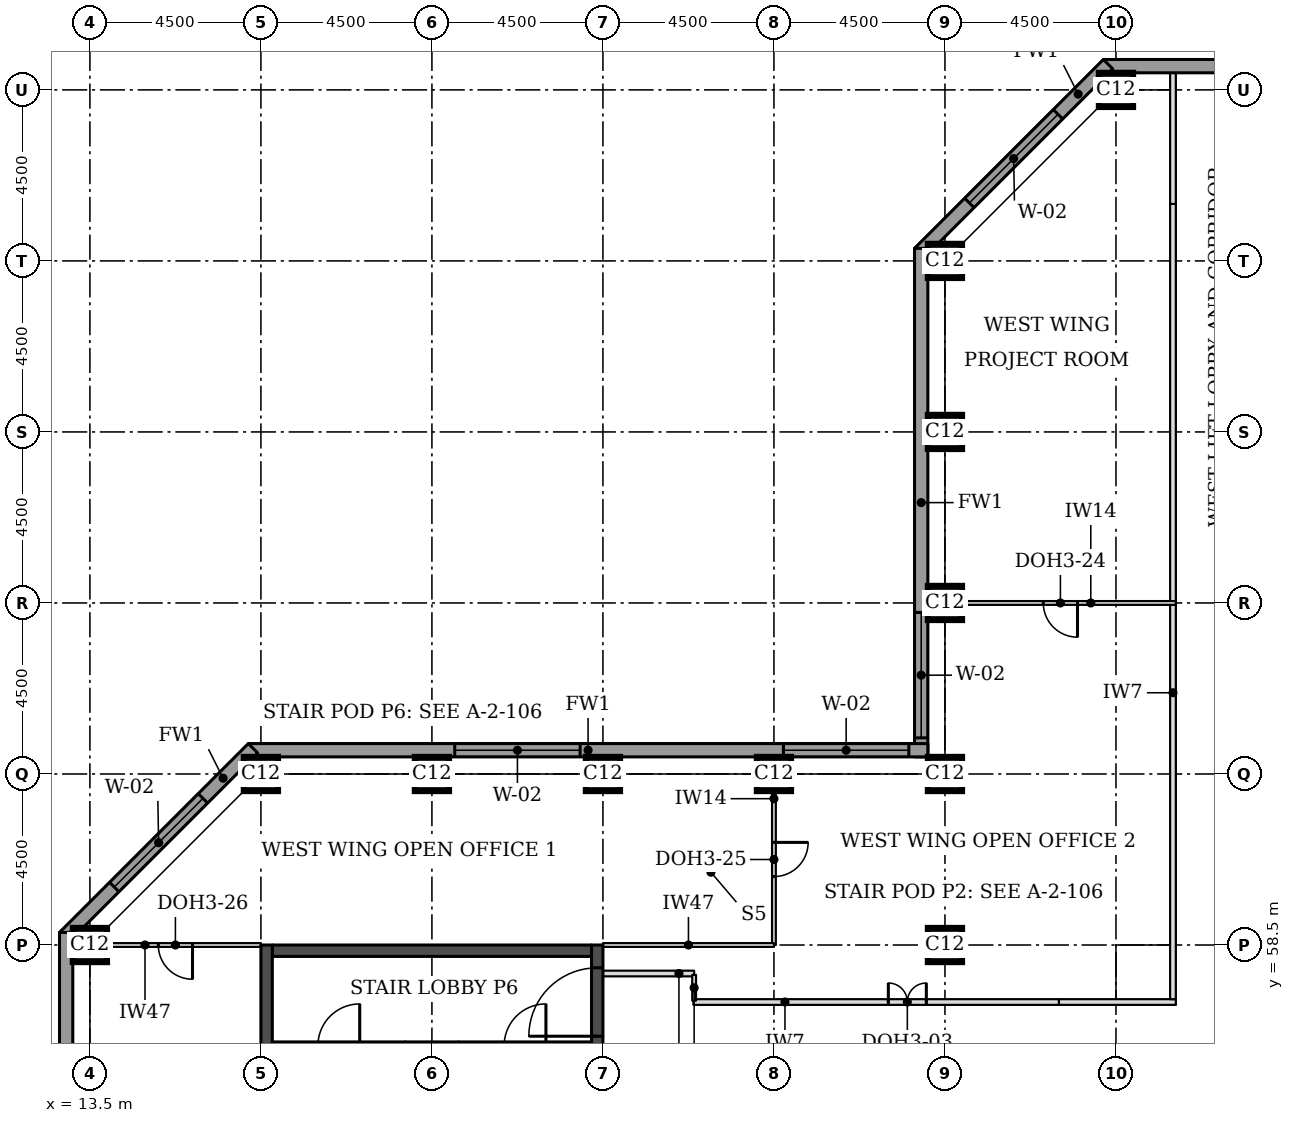
"""IFC4 building model, lengths in metres.
Left out: names, types, materials, properties, quantities, classifications, styles, units other than length and angle.
Written with IfcOpenShell. Run it as: python <this file> out.ifc"""

import sys

from ifc_helpers import new_model, si_unit, direction, frame, frame_2d, origin, origin_2d, place, context, subcontext, project, spatial, rectangle, extrude, element, fill, save


model = new_model("IFC4")
c1 = context("Model", 3, precision=1e-05, world=origin(), true_north=direction((0.0, 1.0)))
c2 = subcontext(c1, "Body", "Model", "MODEL_VIEW")
j1 = project(units=[si_unit("LENGTHUNIT", "METRE"), si_unit("PLANEANGLEUNIT", "RADIAN")], contexts=[c1])
p1 = place(None, origin())
s1 = spatial("IfcSite", under=j1, at=p1, CompositionType="ELEMENT")
p2 = place(p1, origin())
s2 = spatial("IfcBuilding", under=s1, at=p2, CompositionType="ELEMENT")
p3 = place(p2, frame((0.0, 0.0, 162.5)))
s3 = spatial("IfcBuildingStorey", under=s2, at=p3, CompositionType="ELEMENT", Elevation=162.5)
for number, where, z_axis, x_axis in (
    (1, (13.5, 58.5, 0.0), (0.0, 0.0, 1.0), (1.0, 0.0, 0.0)),
    (2, (36.0, 58.5, 0.0), (0.0, 0.0, 1.0), (1.0, 0.0, 0.0)),
    (3, (18.0, 63.0, 0.0), (0.0, 0.0, 1.0), (1.0, 0.0, 0.0)),
    (4, (22.5, 63.0, 0.0), (0.0, 0.0, 1.0), (1.0, 0.0, 0.0)),
    (5, (27.0, 63.0, 0.0), (0.0, 0.0, 1.0), (1.0, 0.0, 0.0)),
    (6, (31.5, 63.0, 0.0), (0.0, 0.0, 1.0), (1.0, 0.0, 0.0)),
    (7, (36.0, 63.0, 0.0), (0.0, 0.0, 1.0), (1.0, 0.0, 0.0)),
    (8, (36.0, 67.5, 0.0), (0.0, 0.0, 1.0), (1.0, 0.0, 0.0)),
    (9, (36.0, 72.0, 0.0), (0.0, 0.0, 1.0), (1.0, 0.0, 0.0)),
    (10, (36.0, 76.5, 0.0), (0.0, 0.0, 1.0), (1.0, 0.0, 0.0)),
    (11, (40.5, 81.0, 0.0), (0.0, 0.0, 1.0), (1.0, 0.0, 0.0)),
):
    element("IfcColumn", number, at=place(p3, frame(where, z_axis=z_axis, x_axis=x_axis)), inside=s3, PredefinedType="COLUMN", context=c2, shape_type="SweptSolid", body=[
        extrude(rectangle(XDim=0.9, YDim=0.9, at=origin_2d()), origin(), (0.0, 0.0, 1.0), 3.7),
    ])
p4 = place(p3, frame((18.3, 58.35, 0.0), z_axis=(0.0, 0.0, 1.0), x_axis=(1.0, 0.0, 0.0)))
e12 = element("IfcWall", 12, at=p4, inside=s3, PredefinedType="SHEAR", context=c2, shape_type="SweptSolid", body=[
    extrude(rectangle(XDim=8.4, YDim=0.3, at=frame_2d((4.2, 0.0))), origin(), (0.0, 0.0, 1.0), 3.7),
])
p5 = place(p3, frame((18.15, 49.5, 0.0), z_axis=(0.0, 0.0, 1.0), x_axis=(0.0, 1.0, 0.0)))
e13 = element("IfcWall", 13, at=p5, inside=s3, PredefinedType="SHEAR", context=c2, shape_type="SweptSolid", body=[
    extrude(rectangle(XDim=9.0, YDim=0.3, at=frame_2d((4.5, 0.0))), origin(), (0.0, 0.0, 1.0), 3.7),
])
p6 = place(p3, frame((26.85, 49.5, 0.0), z_axis=(0.0, 0.0, 1.0), x_axis=(0.0, 1.0, 0.0)))
e14 = element("IfcWall", 14, at=p6, inside=s3, PredefinedType="SHEAR", context=c2, shape_type="SweptSolid", body=[
    extrude(rectangle(XDim=9.0, YDim=0.3, at=frame_2d((4.5, 0.0))), origin(), (0.0, 0.0, 1.0), 3.7),
])
p7 = place(p6, frame((6.6, 0.0, 0.0)))
e15 = element("IfcOpeningElement", 15, at=p7, cuts=e14, PredefinedType="OPENING", context=c2, shape_type="SweptSolid", body=[
    extrude(rectangle(XDim=1.8, YDim=2.1, at=frame_2d((0.9, 1.05))), frame((0.0, 0.16, 0.0), z_axis=(0.0, -1.0, 0.0), x_axis=(1.0, 0.0, 0.0)), (0.0, 0.0, 1.0), 0.32),
])
p8 = place(p3, frame((72.331, 81.625, 0.0), z_axis=(0.0, 0.0, 1.0), x_axis=(-1.0, 0.0, 0.0)))
e16 = element("IfcWall", 16, at=p8, inside=s3, PredefinedType="STANDARD", context=c2, shape_type="SweptSolid", body=[
    extrude(rectangle(XDim=32.163, YDim=0.35, at=frame_2d((16.081, 0.0))), origin(), (0.0, 0.0, 1.0), 3.525),
])
p9 = place(p8, frame((5.431, 0.0, 0.9)))
e17 = element("IfcOpeningElement", 17, at=p9, cuts=e16, PredefinedType="OPENING", context=c2, shape_type="SweptSolid", body=[
    extrude(rectangle(XDim=3.3, YDim=1.9, at=frame_2d((1.65, 0.95))), frame((0.0, 0.185, 0.0), z_axis=(0.0, -1.0, 0.0), x_axis=(1.0, 0.0, 0.0)), (0.0, 0.0, 1.0), 0.37),
])
p10 = place(p8, frame((9.931, 0.0, 0.9)))
e18 = element("IfcOpeningElement", 18, at=p10, cuts=e16, PredefinedType="OPENING", context=c2, shape_type="SweptSolid", body=[
    extrude(rectangle(XDim=3.3, YDim=1.9, at=frame_2d((1.65, 0.95))), frame((0.0, 0.185, 0.0), z_axis=(0.0, -1.0, 0.0), x_axis=(1.0, 0.0, 0.0)), (0.0, 0.0, 1.0), 0.37),
])
p11 = place(p8, frame((14.431, 0.0, 0.9)))
e19 = element("IfcOpeningElement", 19, at=p11, cuts=e16, PredefinedType="OPENING", context=c2, shape_type="SweptSolid", body=[
    extrude(rectangle(XDim=3.3, YDim=1.9, at=frame_2d((1.65, 0.95))), frame((0.0, 0.185, 0.0), z_axis=(0.0, -1.0, 0.0), x_axis=(1.0, 0.0, 0.0)), (0.0, 0.0, 1.0), 0.37),
])
p12 = place(p8, frame((18.931, 0.0, 0.9)))
e20 = element("IfcOpeningElement", 20, at=p12, cuts=e16, PredefinedType="OPENING", context=c2, shape_type="SweptSolid", body=[
    extrude(rectangle(XDim=3.3, YDim=1.9, at=frame_2d((1.65, 0.95))), frame((0.0, 0.185, 0.0), z_axis=(0.0, -1.0, 0.0), x_axis=(1.0, 0.0, 0.0)), (0.0, 0.0, 1.0), 0.37),
])
p13 = place(p8, frame((23.431, 0.0, 0.9)))
e21 = element("IfcOpeningElement", 21, at=p13, cuts=e16, PredefinedType="OPENING", context=c2, shape_type="SweptSolid", body=[
    extrude(rectangle(XDim=3.3, YDim=1.9, at=frame_2d((1.65, 0.95))), frame((0.0, 0.185, 0.0), z_axis=(0.0, -1.0, 0.0), x_axis=(1.0, 0.0, 0.0)), (0.0, 0.0, 1.0), 0.37),
])
p14 = place(p3, frame((40.292, 81.676, 0.0), z_axis=(0.0, 0.0, 1.0), x_axis=(-0.707106781187, -0.707106781187, 0.0)))
e22 = element("IfcWall", 22, at=p14, inside=s3, PredefinedType="STANDARD", context=c2, shape_type="SweptSolid", body=[
    extrude(rectangle(XDim=7.027, YDim=0.35, at=frame_2d((3.513, 0.0))), origin(), (0.0, 0.0, 1.0), 3.525),
])
p15 = place(p14, frame((1.863, 0.0, 0.9)))
e23 = element("IfcOpeningElement", 23, at=p15, cuts=e22, PredefinedType="OPENING", context=c2, shape_type="SweptSolid", body=[
    extrude(rectangle(XDim=3.3, YDim=1.9, at=frame_2d((1.65, 0.95))), frame((0.0, 0.185, 0.0), z_axis=(0.0, -1.0, 0.0), x_axis=(1.0, 0.0, 0.0)), (0.0, 0.0, 1.0), 0.37),
])
p16 = place(p3, frame((35.375, 76.831, 0.0), z_axis=(0.0, 0.0, 1.0), x_axis=(0.0, -1.0, 0.0)))
e24 = element("IfcWall", 24, at=p16, inside=s3, PredefinedType="STANDARD", context=c2, shape_type="SweptSolid", body=[
    extrude(rectangle(XDim=13.381, YDim=0.35, at=frame_2d((6.691, 0.0))), origin(), (0.0, 0.0, 1.0), 3.525),
])
p17 = place(p16, frame((9.581, 0.0, 0.9)))
e25 = element("IfcOpeningElement", 25, at=p17, cuts=e24, PredefinedType="OPENING", context=c2, shape_type="SweptSolid", body=[
    extrude(rectangle(XDim=3.3, YDim=1.9, at=frame_2d((1.65, 0.95))), frame((0.0, 0.185, 0.0), z_axis=(0.0, -1.0, 0.0), x_axis=(1.0, 0.0, 0.0)), (0.0, 0.0, 1.0), 0.37),
])
p18 = place(p3, frame((35.55, 63.625, 0.0), z_axis=(0.0, 0.0, 1.0), x_axis=(-1.0, 0.0, 0.0)))
e26 = element("IfcWall", 26, at=p18, inside=s3, PredefinedType="STANDARD", context=c2, shape_type="SweptSolid", body=[
    extrude(rectangle(XDim=17.881, YDim=0.35, at=frame_2d((8.941, 0.0))), origin(), (0.0, 0.0, 1.0), 3.525),
])
p19 = place(p18, frame((0.5, 0.0, 0.9)))
e27 = element("IfcOpeningElement", 27, at=p19, cuts=e26, PredefinedType="OPENING", context=c2, shape_type="SweptSolid", body=[
    extrude(rectangle(XDim=3.3, YDim=1.9, at=frame_2d((1.65, 0.95))), frame((0.0, 0.185, 0.0), z_axis=(0.0, -1.0, 0.0), x_axis=(1.0, 0.0, 0.0)), (0.0, 0.0, 1.0), 0.37),
])
p20 = place(p18, frame((9.15, 0.0, 0.9)))
e28 = element("IfcOpeningElement", 28, at=p20, cuts=e26, PredefinedType="OPENING", context=c2, shape_type="SweptSolid", body=[
    extrude(rectangle(XDim=3.3, YDim=1.9, at=frame_2d((1.65, 0.95))), frame((0.0, 0.185, 0.0), z_axis=(0.0, -1.0, 0.0), x_axis=(1.0, 0.0, 0.0)), (0.0, 0.0, 1.0), 0.37),
])
p21 = place(p3, frame((17.792, 63.676, 0.0), z_axis=(0.0, 0.0, 1.0), x_axis=(-0.707106781187, -0.707106781187, 0.0)))
e29 = element("IfcWall", 29, at=p21, inside=s3, PredefinedType="STANDARD", context=c2, shape_type="SweptSolid", body=[
    extrude(rectangle(XDim=7.027, YDim=0.35, at=frame_2d((3.513, 0.0))), origin(), (0.0, 0.0, 1.0), 3.525),
])
p22 = place(p21, frame((1.863, 0.0, 0.9)))
e30 = element("IfcOpeningElement", 30, at=p22, cuts=e29, PredefinedType="OPENING", context=c2, shape_type="SweptSolid", body=[
    extrude(rectangle(XDim=3.3, YDim=1.9, at=frame_2d((1.65, 0.95))), frame((0.0, 0.185, 0.0), z_axis=(0.0, -1.0, 0.0), x_axis=(1.0, 0.0, 0.0)), (0.0, 0.0, 1.0), 0.37),
])
p23 = place(p3, frame((12.875, 58.831, 0.0), z_axis=(0.0, 0.0, 1.0), x_axis=(0.0, -1.0, 0.0)))
e31 = element("IfcWall", 31, at=p23, inside=s3, PredefinedType="STANDARD", context=c2, shape_type="SweptSolid", body=[
    extrude(rectangle(XDim=14.163, YDim=0.35, at=frame_2d((7.081, 0.0))), origin(), (0.0, 0.0, 1.0), 3.525),
])
p24 = place(p23, frame((5.431, 0.0, 0.9)))
e32 = element("IfcOpeningElement", 32, at=p24, cuts=e31, PredefinedType="OPENING", context=c2, shape_type="SweptSolid", body=[
    extrude(rectangle(XDim=3.3, YDim=1.9, at=frame_2d((1.65, 0.95))), frame((0.0, 0.185, 0.0), z_axis=(0.0, -1.0, 0.0), x_axis=(1.0, 0.0, 0.0)), (0.0, 0.0, 1.0), 0.37),
])
p25 = place(p3, frame((29.38, 57.0, 0.0), z_axis=(0.0, 0.0, 1.0), x_axis=(1.0, 0.0, 0.0)))
e33 = element("IfcWall", 33, at=p25, inside=s3, PredefinedType="PARTITIONING", context=c2, shape_type="SweptSolid", body=[
    extrude(rectangle(XDim=9.62, YDim=0.15, at=frame_2d((4.81, 0.0))), origin(), (0.0, 0.0, 1.0), 3.55),
])
p26 = place(p25, frame((5.13, 0.0, 0.0)))
e34 = element("IfcOpeningElement", 34, at=p26, cuts=e33, PredefinedType="OPENING", context=c2, shape_type="SweptSolid", body=[
    extrude(rectangle(XDim=1.0, YDim=2.1, at=frame_2d((0.5, 1.05))), frame((0.0, 0.085, 0.0), z_axis=(0.0, -1.0, 0.0), x_axis=(1.0, 0.0, 0.0)), (0.0, 0.0, 1.0), 0.17),
])
p27 = place(p3, frame((39.0, 57.0, 0.0), z_axis=(0.0, 0.0, 1.0), x_axis=(1.0, 0.0, 0.0)))
e35 = element("IfcWall", 35, at=p27, inside=s3, PredefinedType="PARTITIONING", context=c2, shape_type="SweptSolid", body=[
    extrude(rectangle(XDim=3.075, YDim=0.15, at=frame_2d((1.538, 0.0))), origin(), (0.0, 0.0, 1.0), 3.55),
])
p28 = place(p3, frame((42.0, 57.075, 0.0), z_axis=(0.0, 0.0, 1.0), x_axis=(0.0, 1.0, 0.0)))
e36 = element("IfcWall", 36, at=p28, inside=s3, PredefinedType="PARTITIONING", context=c2, shape_type="SweptSolid", body=[
    extrude(rectangle(XDim=20.925, YDim=0.15, at=frame_2d((10.462, 0.0))), origin(), (0.0, 0.0, 1.0), 3.55),
])
p29 = place(p3, frame((42.0, 78.0, 0.0), z_axis=(0.0, 0.0, 1.0), x_axis=(0.0, 1.0, 0.0)))
e37 = element("IfcWall", 37, at=p29, inside=s3, PredefinedType="PARTITIONING", context=c2, shape_type="SweptSolid", body=[
    extrude(rectangle(XDim=3.45, YDim=0.15, at=frame_2d((1.725, 0.0))), origin(), (0.0, 0.0, 1.0), 3.55),
])
p30 = place(p3, frame((36.0, 67.5, 0.0), z_axis=(0.0, 0.0, 1.0), x_axis=(1.0, 0.0, 0.0)))
e38 = element("IfcWall", 38, at=p30, inside=s3, PredefinedType="PARTITIONING", context=c2, shape_type="SweptSolid", body=[
    extrude(rectangle(XDim=6.075, YDim=0.1, at=frame_2d((3.038, 0.0))), origin(), (0.0, 0.0, 1.0), 3.55),
])
p31 = place(p30, frame((2.588, 0.0, 0.0)))
e39 = element("IfcOpeningElement", 39, at=p31, cuts=e38, PredefinedType="OPENING", context=c2, shape_type="SweptSolid", body=[
    extrude(rectangle(XDim=0.9, YDim=2.1, at=frame_2d((0.45, 1.05))), frame((0.0, 0.06, 0.0), z_axis=(0.0, -1.0, 0.0), x_axis=(1.0, 0.0, 0.0)), (0.0, 0.0, 1.0), 0.12),
])
p32 = place(p3, frame((31.5, 63.0, 0.0), z_axis=(0.0, 0.0, 1.0), x_axis=(0.0, -1.0, 0.0)))
e40 = element("IfcWall", 40, at=p32, inside=s3, PredefinedType="PARTITIONING", context=c2, shape_type="SweptSolid", body=[
    extrude(rectangle(XDim=4.5, YDim=0.1, at=frame_2d((2.25, 0.0))), origin(), (0.0, 0.0, 1.0), 3.55),
])
p33 = place(p32, frame((1.8, 0.0, 0.0)))
e41 = element("IfcOpeningElement", 41, at=p33, cuts=e40, PredefinedType="OPENING", context=c2, shape_type="SweptSolid", body=[
    extrude(rectangle(XDim=0.9, YDim=2.1, at=frame_2d((0.45, 1.05))), frame((0.0, 0.06, 0.0), z_axis=(0.0, -1.0, 0.0), x_axis=(1.0, 0.0, 0.0)), (0.0, 0.0, 1.0), 0.12),
])
p34 = place(p3, frame((31.5, 58.5, 0.0), z_axis=(0.0, 0.0, 1.0), x_axis=(-1.0, 0.0, 0.0)))
e42 = element("IfcWall", 42, at=p34, inside=s3, PredefinedType="PARTITIONING", context=c2, shape_type="SweptSolid", body=[
    extrude(rectangle(XDim=4.5, YDim=0.1, at=frame_2d((2.25, 0.0))), origin(), (0.0, 0.0, 1.0), 2.55),
])
p35 = place(p3, frame((13.5, 58.5, 0.0), z_axis=(0.0, 0.0, 1.0), x_axis=(1.0, 0.0, 0.0)))
e43 = element("IfcWall", 43, at=p35, inside=s3, PredefinedType="PARTITIONING", context=c2, shape_type="SweptSolid", body=[
    extrude(rectangle(XDim=4.5, YDim=0.1, at=frame_2d((2.25, 0.0))), origin(), (0.0, 0.0, 1.0), 2.55),
])
p36 = place(p35, frame((1.8, 0.0, 0.0)))
e44 = element("IfcOpeningElement", 44, at=p36, cuts=e43, PredefinedType="OPENING", context=c2, shape_type="SweptSolid", body=[
    extrude(rectangle(XDim=0.9, YDim=2.1, at=frame_2d((0.45, 1.05))), frame((0.0, 0.06, 0.0), z_axis=(0.0, -1.0, 0.0), x_axis=(1.0, 0.0, 0.0)), (0.0, 0.0, 1.0), 0.12),
])
p37 = place(p3, frame((27.0, 57.75, 0.0), z_axis=(0.0, 0.0, 1.0), x_axis=(1.0, 0.0, 0.0)))
e45 = element("IfcWall", 45, at=p37, inside=s3, PredefinedType="PARTITIONING", context=c2, shape_type="SweptSolid", body=[
    extrude(rectangle(XDim=2.4, YDim=0.15, at=frame_2d((1.2, 0.0))), origin(), (0.0, 0.0, 1.0), 3.55),
])
p38 = place(p3, frame((29.4, 57.715, 0.0), z_axis=(0.0, 0.0, 1.0), x_axis=(0.0, -1.0, 0.0)))
e46 = element("IfcWall", 46, at=p38, inside=s3, PredefinedType="PARTITIONING", context=c2, shape_type="SweptSolid", body=[
    extrude(rectangle(XDim=0.68, YDim=0.1, at=frame_2d((0.34, 0.0))), origin(), (0.0, 0.0, 1.0), 3.55),
])
p39 = place(p3, frame((21.8, 55.85, 0.0), z_axis=(0.0, 0.0, 1.0), x_axis=(1.0, 0.0, 0.0)))
e47 = element("IfcWall", 47, at=p39, inside=s3, PredefinedType="SOLIDWALL", context=c2, shape_type="SweptSolid", body=[
    extrude(rectangle(XDim=1.4, YDim=0.2, at=frame_2d((0.7, 0.0))), origin(), (0.0, 0.0, 1.0), 3.55),
])
p40 = place(p3, frame((18.3, 55.85, 0.0), z_axis=(0.0, 0.0, 1.0), x_axis=(1.0, 0.0, 0.0)))
e48 = element("IfcWall", 48, at=p40, inside=s3, PredefinedType="SOLIDWALL", context=c2, shape_type="SweptSolid", body=[
    extrude(rectangle(XDim=3.5, YDim=0.2, at=frame_2d((1.75, 0.0))), origin(), (0.0, 0.0, 1.0), 3.55),
])
p41 = place(p40, frame((1.2, 0.0, 0.0)))
e49 = element("IfcOpeningElement", 49, at=p41, cuts=e48, PredefinedType="OPENING", context=c2, shape_type="SweptSolid", body=[
    extrude(rectangle(XDim=1.1, YDim=2.1, at=frame_2d((0.55, 1.05))), frame((0.0, 0.11, 0.0), z_axis=(0.0, -1.0, 0.0), x_axis=(1.0, 0.0, 0.0)), (0.0, 0.0, 1.0), 0.22),
])
p42 = place(p3, frame((23.2, 55.85, 0.0), z_axis=(0.0, 0.0, 1.0), x_axis=(1.0, 0.0, 0.0)))
e50 = element("IfcWall", 50, at=p42, inside=s3, PredefinedType="SOLIDWALL", context=c2, shape_type="SweptSolid", body=[
    extrude(rectangle(XDim=3.5, YDim=0.2, at=frame_2d((1.75, 0.0))), origin(), (0.0, 0.0, 1.0), 3.55),
])
p43 = place(p42, frame((1.2, 0.0, 0.0)))
e51 = element("IfcOpeningElement", 51, at=p43, cuts=e50, PredefinedType="OPENING", context=c2, shape_type="SweptSolid", body=[
    extrude(rectangle(XDim=1.1, YDim=2.1, at=frame_2d((0.55, 1.05))), frame((0.0, 0.11, 0.0), z_axis=(0.0, -1.0, 0.0), x_axis=(1.0, 0.0, 0.0)), (0.0, 0.0, 1.0), 0.22),
])
p44 = place(p15, origin())
e52 = element("IfcWindow", 52, at=p44, inside=s3, PartitioningType="SINGLE_PANEL", PredefinedType="WINDOW", context=c2, shape_type="SweptSolid", body=[
    extrude(rectangle(XDim=3.3, YDim=1.9, at=frame_2d((1.65, 0.95))), frame((0.0, 0.085, 0.0), z_axis=(0.0, -1.0, 0.0), x_axis=(1.0, 0.0, 0.0)), (0.0, 0.0, 1.0), 0.06),
])
fill(e23, e52)
p45 = place(p17, origin())
e53 = element("IfcWindow", 53, at=p45, inside=s3, PartitioningType="SINGLE_PANEL", PredefinedType="WINDOW", context=c2, shape_type="SweptSolid", body=[
    extrude(rectangle(XDim=3.3, YDim=1.9, at=frame_2d((1.65, 0.95))), frame((0.0, 0.085, 0.0), z_axis=(0.0, -1.0, 0.0), x_axis=(1.0, 0.0, 0.0)), (0.0, 0.0, 1.0), 0.06),
])
fill(e25, e53)
p46 = place(p19, origin())
e54 = element("IfcWindow", 54, at=p46, inside=s3, PartitioningType="SINGLE_PANEL", PredefinedType="WINDOW", context=c2, shape_type="SweptSolid", body=[
    extrude(rectangle(XDim=3.3, YDim=1.9, at=frame_2d((1.65, 0.95))), frame((0.0, 0.085, 0.0), z_axis=(0.0, -1.0, 0.0), x_axis=(1.0, 0.0, 0.0)), (0.0, 0.0, 1.0), 0.06),
])
fill(e27, e54)
p47 = place(p20, origin())
e55 = element("IfcWindow", 55, at=p47, inside=s3, PartitioningType="SINGLE_PANEL", PredefinedType="WINDOW", context=c2, shape_type="SweptSolid", body=[
    extrude(rectangle(XDim=3.3, YDim=1.9, at=frame_2d((1.65, 0.95))), frame((0.0, 0.085, 0.0), z_axis=(0.0, -1.0, 0.0), x_axis=(1.0, 0.0, 0.0)), (0.0, 0.0, 1.0), 0.06),
])
fill(e28, e55)
p48 = place(p22, origin())
e56 = element("IfcWindow", 56, at=p48, inside=s3, PartitioningType="SINGLE_PANEL", PredefinedType="WINDOW", context=c2, shape_type="SweptSolid", body=[
    extrude(rectangle(XDim=3.3, YDim=1.9, at=frame_2d((1.65, 0.95))), frame((0.0, 0.085, 0.0), z_axis=(0.0, -1.0, 0.0), x_axis=(1.0, 0.0, 0.0)), (0.0, 0.0, 1.0), 0.06),
])
fill(e30, e56)
p49 = place(p26, origin())
e57 = element("IfcDoor", 57, at=p49, inside=s3, OperationType="DOUBLE_DOOR_SINGLE_SWING", PredefinedType="DOOR", context=c2, shape_type="SweptSolid", body=[
    extrude(rectangle(XDim=1.0, YDim=2.1, at=frame_2d((0.5, 1.05))), frame((0.0, 0.025, 0.0), z_axis=(0.0, -1.0, 0.0), x_axis=(1.0, 0.0, 0.0)), (0.0, 0.0, 1.0), 0.05),
])
fill(e34, e57)
p50 = place(p33, origin())
e58 = element("IfcDoor", 58, at=p50, inside=s3, OperationType="SINGLE_SWING_LEFT", PredefinedType="DOOR", context=c2, shape_type="SweptSolid", body=[
    extrude(rectangle(XDim=0.9, YDim=2.1, at=frame_2d((0.45, 1.05))), frame((0.0, 0.025, 0.0), z_axis=(0.0, -1.0, 0.0), x_axis=(1.0, 0.0, 0.0)), (0.0, 0.0, 1.0), 0.05),
])
fill(e41, e58)
p51 = place(p31, frame((0.9, 0.0, 0.0), z_axis=(0.0, 0.0, 1.0), x_axis=(-1.0, 0.0, 0.0)))
e59 = element("IfcDoor", 59, at=p51, inside=s3, OperationType="SINGLE_SWING_LEFT", PredefinedType="DOOR", context=c2, shape_type="SweptSolid", body=[
    extrude(rectangle(XDim=0.9, YDim=2.1, at=frame_2d((0.45, 1.05))), frame((0.0, 0.025, 0.0), z_axis=(0.0, -1.0, 0.0), x_axis=(1.0, 0.0, 0.0)), (0.0, 0.0, 1.0), 0.05),
])
fill(e39, e59)
p52 = place(p36, frame((0.9, 0.0, 0.0), z_axis=(0.0, 0.0, 1.0), x_axis=(-1.0, 0.0, 0.0)))
e60 = element("IfcDoor", 60, at=p52, inside=s3, OperationType="SINGLE_SWING_LEFT", PredefinedType="DOOR", context=c2, shape_type="SweptSolid", body=[
    extrude(rectangle(XDim=0.9, YDim=2.1, at=frame_2d((0.45, 1.05))), frame((0.0, 0.025, 0.0), z_axis=(0.0, -1.0, 0.0), x_axis=(1.0, 0.0, 0.0)), (0.0, 0.0, 1.0), 0.05),
])
fill(e44, e60)
p53 = place(p7, origin())
e61 = element("IfcDoor", 61, at=p53, inside=s3, OperationType="SINGLE_SWING_LEFT", PredefinedType="DOOR", context=c2, shape_type="SweptSolid", body=[
    extrude(rectangle(XDim=1.8, YDim=2.1, at=frame_2d((0.9, 1.05))), frame((0.0, 0.025, 0.0), z_axis=(0.0, -1.0, 0.0), x_axis=(1.0, 0.0, 0.0)), (0.0, 0.0, 1.0), 0.05),
])
fill(e15, e61)
save(model, sys.argv[1])
